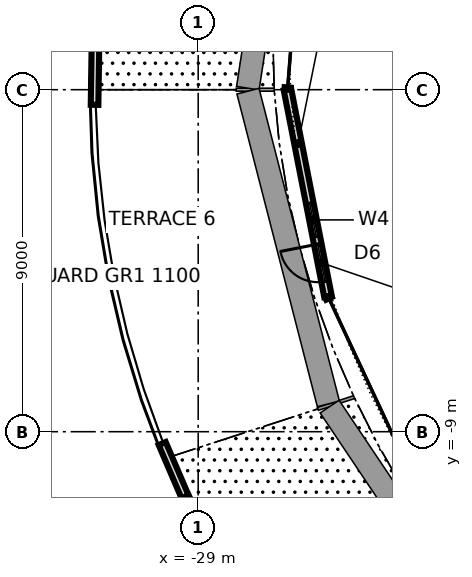
"""IFC4 building model, lengths in metres.
Left out: names, types, materials, properties, quantities, classifications, styles, units other than length and angle.
Written with IfcOpenShell. Run it as: python <this file> out.ifc"""

import sys

from ifc_helpers import new_model, si_unit, direction, frame, frame_2d, origin, place, context, subcontext, project, spatial, rectangle, extrude, element, fill, save


model = new_model("IFC4")
c1 = context("Model", 3, precision=1e-05, world=origin(), true_north=direction((0.0, 1.0)))
c2 = subcontext(c1, "Body", "Model", "MODEL_VIEW")
j1 = project(units=[si_unit("LENGTHUNIT", "METRE"), si_unit("PLANEANGLEUNIT", "RADIAN")], contexts=[c1])
p1 = place(None, origin())
s1 = spatial("IfcSite", under=j1, at=p1, CompositionType="ELEMENT")
p2 = place(p1, origin())
s2 = spatial("IfcBuilding", under=s1, at=p2, CompositionType="ELEMENT")
p3 = place(p2, frame((0.0, 0.0, 19.6)))
s3 = spatial("IfcBuildingStorey", under=s2, at=p3, CompositionType="ELEMENT", Elevation=19.6)
p4 = place(p3, frame((-26.65, 0.0, 0.0), z_axis=(0.0, 0.0, 1.0), x_axis=(0.192217304828, -0.981352387129, 0.0)))
e1 = element("IfcWall", 1, at=p4, inside=s3, PredefinedType="SOLIDWALL", context=c2, shape_type="SweptSolid", body=[
    extrude(rectangle(XDim=5.542, YDim=0.2, at=frame_2d((2.771, 0.0))), origin(), (0.0, 0.0, 1.0), 4.04),
])
p5 = place(p4, frame((4.142, 0.0, 0.0)))
e2 = element("IfcOpeningElement", 2, at=p5, cuts=e1, PredefinedType="OPENING", context=c2, shape_type="SweptSolid", body=[
    extrude(rectangle(XDim=1.0, YDim=2.4, at=frame_2d((0.5, 1.2))), frame((0.0, 0.11, 0.0), z_axis=(0.0, -1.0, 0.0), x_axis=(1.0, 0.0, 0.0)), (0.0, 0.0, 1.0), 0.22),
])
p6 = place(p4, frame((3.042, 0.0, 0.3)))
e3 = element("IfcOpeningElement", 3, at=p6, cuts=e1, PredefinedType="OPENING", context=c2, shape_type="SweptSolid", body=[
    extrude(rectangle(XDim=0.9, YDim=2.1, at=frame_2d((0.45, 1.05))), frame((0.0, 0.11, 0.0), z_axis=(0.0, -1.0, 0.0), x_axis=(1.0, 0.0, 0.0)), (0.0, 0.0, 1.0), 0.22),
])
p7 = place(p4, frame((4.142, 0.0, 2.7)))
e4 = element("IfcOpeningElement", 4, at=p7, cuts=e1, PredefinedType="OPENING", context=c2, shape_type="SweptSolid", body=[
    extrude(rectangle(XDim=1.0, YDim=0.6, at=frame_2d((0.5, 0.3))), frame((0.0, 0.11, 0.0), z_axis=(0.0, -1.0, 0.0), x_axis=(1.0, 0.0, 0.0)), (0.0, 0.0, 1.0), 0.22),
])
p8 = place(p3, frame((-31.704, 1.14, 0.0), z_axis=(0.0, 0.0, 1.0), x_axis=(-0.014760296613, -0.999891060888, 0.0)))
e5 = element("IfcWall", 5, at=p8, inside=s3, PredefinedType="PARAPET", context=c2, shape_type="SweptSolid", body=[
    extrude(rectangle(XDim=1.538, YDim=0.2, at=frame_2d((0.769, 0.0))), origin(), (0.0, 0.0, 1.0), 1.1),
])
p9 = place(p3, frame((-29.947, -9.311, 0.0), z_axis=(0.0, 0.0, 1.0), x_axis=(0.394595388876, -0.918854982616, 0.0)))
e6 = element("IfcWall", 6, at=p9, inside=s3, PredefinedType="PARAPET", context=c2, shape_type="SweptSolid", body=[
    extrude(rectangle(XDim=1.525, YDim=0.2, at=frame_2d((0.763, 0.0))), origin(), (0.0, 0.0, 1.0), 1.1),
])
p10 = place(p3, frame((-29.345, -10.712, 0.0), z_axis=(0.0, 0.0, 1.0), x_axis=(0.447470559416, -0.894298662895, 0.0)))
e7 = element("IfcWall", 7, at=p10, inside=s3, PredefinedType="PARAPET", context=c2, shape_type="SweptSolid", body=[
    extrude(rectangle(XDim=1.52, YDim=0.2, at=frame_2d((0.76, 0.0))), origin(), (0.0, 0.0, 1.0), 1.1),
])
p11 = place(p5, frame((1.0, 0.0, 0.0), z_axis=(0.0, 0.0, 1.0), x_axis=(-1.0, 0.0, 0.0)))
e8 = element("IfcDoor", 8, at=p11, inside=s3, OperationType="SINGLE_SWING_RIGHT", PredefinedType="DOOR", context=c2, shape_type="SweptSolid", body=[
    extrude(rectangle(XDim=1.0, YDim=2.4, at=frame_2d((0.5, 1.2))), frame((0.0, 0.025, 0.0), z_axis=(0.0, -1.0, 0.0), x_axis=(1.0, 0.0, 0.0)), (0.0, 0.0, 1.0), 0.05),
])
fill(e2, e8)
p12 = place(p6, origin())
e9 = element("IfcWindow", 9, at=p12, inside=s3, PartitioningType="SINGLE_PANEL", PredefinedType="WINDOW", context=c2, shape_type="SweptSolid", body=[
    extrude(rectangle(XDim=0.9, YDim=2.1, at=frame_2d((0.45, 1.05))), frame((0.0, 0.03, 0.0), z_axis=(0.0, -1.0, 0.0), x_axis=(1.0, 0.0, 0.0)), (0.0, 0.0, 1.0), 0.06),
])
fill(e3, e9)
p13 = place(p7, origin())
e10 = element("IfcWindow", 10, at=p13, inside=s3, PartitioningType="SINGLE_PANEL", PredefinedType="WINDOW", context=c2, shape_type="SweptSolid", body=[
    extrude(rectangle(XDim=1.0, YDim=0.6, at=frame_2d((0.5, 0.3))), frame((0.0, 0.03, 0.0), z_axis=(0.0, -1.0, 0.0), x_axis=(1.0, 0.0, 0.0)), (0.0, 0.0, 1.0), 0.06),
])
fill(e4, e10)
save(model, sys.argv[1])
